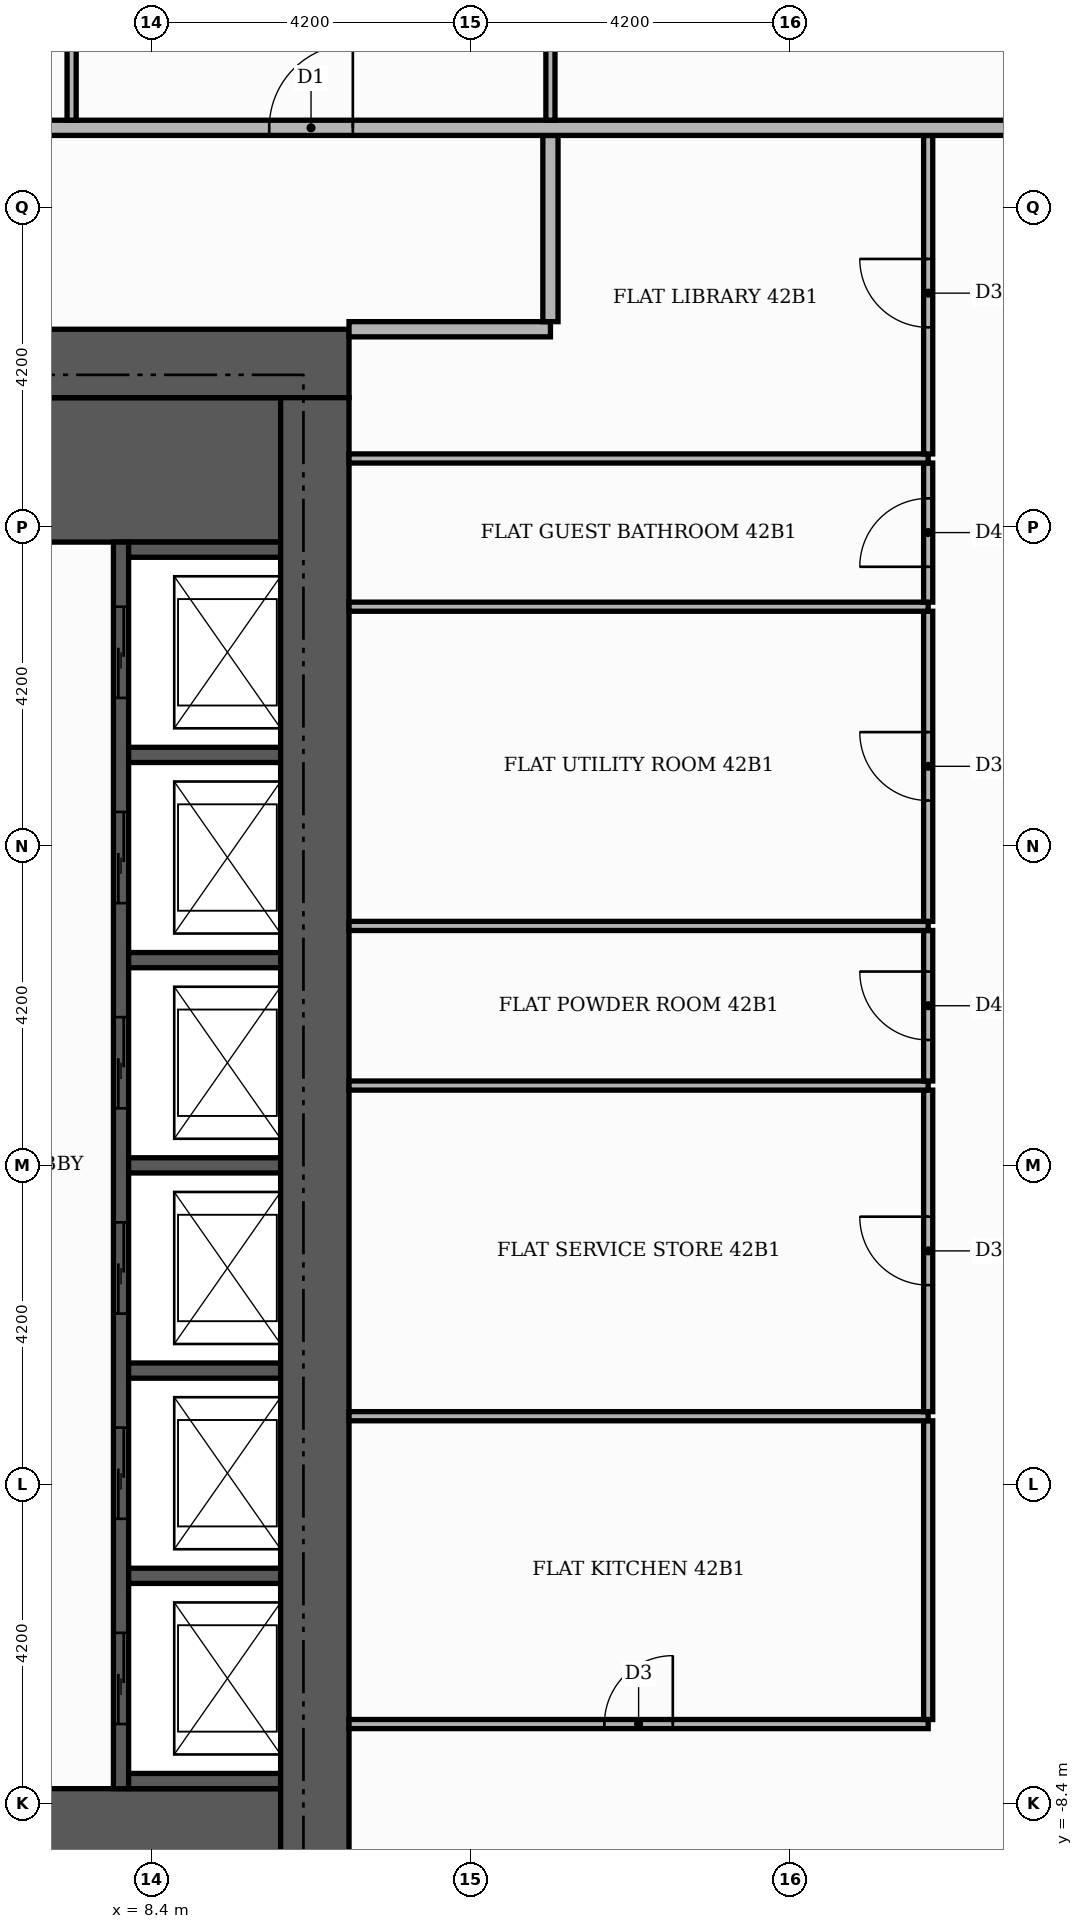
"""IFC4 building model, lengths in metres.
Left out: names, types, materials, properties, quantities, classifications, styles, units other than length and angle.
Written with IfcOpenShell. Run it as: python <this file> out.ifc"""

import sys

from ifc_helpers import new_model, si_unit, direction, frame, frame_2d, origin, place, context, subcontext, project, spatial, rectangle, extrude, element, fill, save


model = new_model("IFC4")
c1 = context("Model", 3, precision=1e-05, world=origin(), true_north=direction((0.0, 1.0)))
c2 = subcontext(c1, "Body", "Model", "MODEL_VIEW")
j1 = project(units=[si_unit("LENGTHUNIT", "METRE"), si_unit("PLANEANGLEUNIT", "RADIAN")], contexts=[c1])
p1 = place(None, origin())
s1 = spatial("IfcSite", under=j1, at=p1, CompositionType="ELEMENT")
p2 = place(p1, origin())
s2 = spatial("IfcBuilding", under=s1, at=p2, CompositionType="ELEMENT")
p3 = place(p2, frame((0.0, 0.0, 176.7)))
s3 = spatial("IfcBuildingStorey", under=s2, at=p3, CompositionType="ELEMENT", Elevation=176.7)
for number, where, z_axis, x_axis in (
    (1, (5.5, -9.15, 0.0), (0.0, 0.0, 1.0), (1.0, 0.0, 0.0)),
    (2, (5.5, 9.15, 0.0), (0.0, 0.0, 1.0), (1.0, 0.0, 0.0)),
):
    element("IfcWall", number, at=place(p3, frame(where, z_axis=z_axis, x_axis=x_axis)), inside=s3, PredefinedType="SHEAR", context=c2, shape_type="SweptSolid", body=[
        extrude(rectangle(XDim=4.6, YDim=1.9, at=frame_2d((2.3, 0.0))), origin(), (0.0, 0.0, 1.0), 3.4),
    ])
p4 = place(p3, frame((8.0, -8.2, 0.0), z_axis=(0.0, 0.0, 1.0), x_axis=(0.0, 1.0, 0.0)))
e3 = element("IfcWall", 3, at=p4, inside=s3, PredefinedType="SHEAR", context=c2, shape_type="SweptSolid", body=[
    extrude(rectangle(XDim=16.4, YDim=0.2, at=frame_2d((8.2, 0.0))), origin(), (0.0, 0.0, 1.0), 3.4),
])
p5 = place(p4, frame((0.85, 0.0, 0.0)))
e4 = element("IfcOpeningElement", 4, at=p5, cuts=e3, PredefinedType="OPENING", context=c2, shape_type="SweptSolid", body=[
    extrude(rectangle(XDim=1.2, YDim=2.1, at=frame_2d((0.6, 1.05))), frame((0.0, 0.11, 0.0), z_axis=(0.0, -1.0, 0.0), x_axis=(1.0, 0.0, 0.0)), (0.0, 0.0, 1.0), 0.22),
])
p6 = place(p4, frame((3.55, 0.0, 0.0)))
e5 = element("IfcOpeningElement", 5, at=p6, cuts=e3, PredefinedType="OPENING", context=c2, shape_type="SweptSolid", body=[
    extrude(rectangle(XDim=1.2, YDim=2.1, at=frame_2d((0.6, 1.05))), frame((0.0, 0.11, 0.0), z_axis=(0.0, -1.0, 0.0), x_axis=(1.0, 0.0, 0.0)), (0.0, 0.0, 1.0), 0.22),
])
p7 = place(p4, frame((6.25, 0.0, 0.0)))
e6 = element("IfcOpeningElement", 6, at=p7, cuts=e3, PredefinedType="OPENING", context=c2, shape_type="SweptSolid", body=[
    extrude(rectangle(XDim=1.2, YDim=2.1, at=frame_2d((0.6, 1.05))), frame((0.0, 0.11, 0.0), z_axis=(0.0, -1.0, 0.0), x_axis=(1.0, 0.0, 0.0)), (0.0, 0.0, 1.0), 0.22),
])
p8 = place(p4, frame((8.95, 0.0, 0.0)))
e7 = element("IfcOpeningElement", 7, at=p8, cuts=e3, PredefinedType="OPENING", context=c2, shape_type="SweptSolid", body=[
    extrude(rectangle(XDim=1.2, YDim=2.1, at=frame_2d((0.6, 1.05))), frame((0.0, 0.11, 0.0), z_axis=(0.0, -1.0, 0.0), x_axis=(1.0, 0.0, 0.0)), (0.0, 0.0, 1.0), 0.22),
])
p9 = place(p4, frame((11.65, 0.0, 0.0)))
e8 = element("IfcOpeningElement", 8, at=p9, cuts=e3, PredefinedType="OPENING", context=c2, shape_type="SweptSolid", body=[
    extrude(rectangle(XDim=1.2, YDim=2.1, at=frame_2d((0.6, 1.05))), frame((0.0, 0.11, 0.0), z_axis=(0.0, -1.0, 0.0), x_axis=(1.0, 0.0, 0.0)), (0.0, 0.0, 1.0), 0.22),
])
p10 = place(p4, frame((14.35, 0.0, 0.0)))
e9 = element("IfcOpeningElement", 9, at=p10, cuts=e3, PredefinedType="OPENING", context=c2, shape_type="SweptSolid", body=[
    extrude(rectangle(XDim=1.2, YDim=2.1, at=frame_2d((0.6, 1.05))), frame((0.0, 0.11, 0.0), z_axis=(0.0, -1.0, 0.0), x_axis=(1.0, 0.0, 0.0)), (0.0, 0.0, 1.0), 0.22),
])
for number, where, z_axis, x_axis in (
    (10, (8.1, -8.1, 0.0), (0.0, 0.0, 1.0), (1.0, 0.0, 0.0)),
    (11, (8.1, -5.4, 0.0), (0.0, 0.0, 1.0), (1.0, 0.0, 0.0)),
    (12, (8.1, -2.7, 0.0), (0.0, 0.0, 1.0), (1.0, 0.0, 0.0)),
    (13, (8.1, 0.0, 0.0), (0.0, 0.0, 1.0), (1.0, 0.0, 0.0)),
    (14, (8.1, 2.7, 0.0), (0.0, 0.0, 1.0), (1.0, 0.0, 0.0)),
    (15, (8.1, 5.4, 0.0), (0.0, 0.0, 1.0), (1.0, 0.0, 0.0)),
    (16, (8.1, 8.1, 0.0), (0.0, 0.0, 1.0), (1.0, 0.0, 0.0)),
):
    element("IfcWall", number, at=place(p3, frame(where, z_axis=z_axis, x_axis=x_axis)), inside=s3, PredefinedType="SHEAR", context=c2, shape_type="SweptSolid", body=[
        extrude(rectangle(XDim=2.0, YDim=0.2, at=frame_2d((1.0, 0.0))), origin(), (0.0, 0.0, 1.0), 3.4),
    ])
p11 = place(p3, frame((-11.0, 10.55, 0.0), z_axis=(0.0, 0.0, 1.0), x_axis=(1.0, 0.0, 0.0)))
e17 = element("IfcWall", 17, at=p11, inside=s3, PredefinedType="SHEAR", context=c2, shape_type="SweptSolid", body=[
    extrude(rectangle(XDim=22.0, YDim=0.9, at=frame_2d((11.0, 0.0))), origin(), (0.0, 0.0, 1.0), 3.4),
])
p12 = place(p11, frame((13.3, 0.0, 0.0)))
e18 = element("IfcOpeningElement", 18, at=p12, cuts=e17, PredefinedType="OPENING", context=c2, shape_type="SweptSolid", body=[
    extrude(rectangle(XDim=1.8, YDim=2.2, at=frame_2d((0.9, 1.1))), frame((0.0, 0.46, 0.0), z_axis=(0.0, -1.0, 0.0), x_axis=(1.0, 0.0, 0.0)), (0.0, 0.0, 1.0), 0.92),
])
p13 = place(p3, frame((10.55, -10.1, 0.0), z_axis=(0.0, 0.0, 1.0), x_axis=(0.0, 1.0, 0.0)))
e19 = element("IfcWall", 19, at=p13, inside=s3, PredefinedType="SHEAR", context=c2, shape_type="SweptSolid", body=[
    extrude(rectangle(XDim=20.2, YDim=0.9, at=frame_2d((10.1, 0.0))), origin(), (0.0, 0.0, 1.0), 3.4),
])
p14 = place(p3, frame((11.0, -7.35, 0.0), z_axis=(0.0, 0.0, 1.0), x_axis=(1.0, 0.0, 0.0)))
e20 = element("IfcWall", 20, at=p14, inside=s3, PredefinedType="PARTITIONING", context=c2, shape_type="SweptSolid", body=[
    extrude(rectangle(XDim=7.62, YDim=0.12, at=frame_2d((3.81, 0.0))), origin(), (0.0, 0.0, 1.0), 3.4),
])
p15 = place(p14, frame((3.36, 0.0, 0.0)))
e21 = element("IfcOpeningElement", 21, at=p15, cuts=e20, PredefinedType="OPENING", context=c2, shape_type="SweptSolid", body=[
    extrude(rectangle(XDim=0.9, YDim=2.1, at=frame_2d((0.45, 1.05))), frame((0.0, 0.07, 0.0), z_axis=(0.0, -1.0, 0.0), x_axis=(1.0, 0.0, 0.0)), (0.0, 0.0, 1.0), 0.14),
])
p16 = place(p3, frame((18.62, -7.29, 0.0), z_axis=(0.0, 0.0, 1.0), x_axis=(0.0, 1.0, 0.0)))
e22 = element("IfcWall", 22, at=p16, inside=s3, PredefinedType="PARTITIONING", context=c2, shape_type="SweptSolid", body=[
    extrude(rectangle(XDim=3.93, YDim=0.12, at=frame_2d((1.965, 0.0))), origin(), (0.0, 0.0, 1.0), 3.4),
])
p17 = place(p3, frame((11.0, -3.3, 0.0), z_axis=(0.0, 0.0, 1.0), x_axis=(1.0, 0.0, 0.0)))
e23 = element("IfcWall", 23, at=p17, inside=s3, PredefinedType="PARTITIONING", context=c2, shape_type="SweptSolid", body=[
    extrude(rectangle(XDim=7.62, YDim=0.12, at=frame_2d((3.81, 0.0))), origin(), (0.0, 0.0, 1.0), 3.4),
])
p18 = place(p3, frame((18.62, -3.24, 0.0), z_axis=(0.0, 0.0, 1.0), x_axis=(0.0, 1.0, 0.0)))
e24 = element("IfcWall", 24, at=p18, inside=s3, PredefinedType="PARTITIONING", context=c2, shape_type="SweptSolid", body=[
    extrude(rectangle(XDim=4.23, YDim=0.12, at=frame_2d((2.115, 0.0))), origin(), (0.0, 0.0, 1.0), 3.4),
])
p19 = place(p18, frame((1.665, 0.0, 0.0)))
e25 = element("IfcOpeningElement", 25, at=p19, cuts=e24, PredefinedType="OPENING", context=c2, shape_type="SweptSolid", body=[
    extrude(rectangle(XDim=0.9, YDim=2.1, at=frame_2d((0.45, 1.05))), frame((0.0, 0.07, 0.0), z_axis=(0.0, -1.0, 0.0), x_axis=(1.0, 0.0, 0.0)), (0.0, 0.0, 1.0), 0.14),
])
p20 = place(p3, frame((11.0, 1.05, 0.0), z_axis=(0.0, 0.0, 1.0), x_axis=(1.0, 0.0, 0.0)))
e26 = element("IfcWall", 26, at=p20, inside=s3, PredefinedType="PARTITIONING", context=c2, shape_type="SweptSolid", body=[
    extrude(rectangle(XDim=7.62, YDim=0.12, at=frame_2d((3.81, 0.0))), origin(), (0.0, 0.0, 1.0), 3.4),
])
p21 = place(p3, frame((18.62, 1.11, 0.0), z_axis=(0.0, 0.0, 1.0), x_axis=(0.0, 1.0, 0.0)))
e27 = element("IfcWall", 27, at=p21, inside=s3, PredefinedType="PARTITIONING", context=c2, shape_type="SweptSolid", body=[
    extrude(rectangle(XDim=1.98, YDim=0.12, at=frame_2d((0.99, 0.0))), origin(), (0.0, 0.0, 1.0), 3.4),
])
p22 = place(p21, frame((0.54, 0.0, 0.0)))
e28 = element("IfcOpeningElement", 28, at=p22, cuts=e27, PredefinedType="OPENING", context=c2, shape_type="SweptSolid", body=[
    extrude(rectangle(XDim=0.9, YDim=2.1, at=frame_2d((0.45, 1.05))), frame((0.0, 0.07, 0.0), z_axis=(0.0, -1.0, 0.0), x_axis=(1.0, 0.0, 0.0)), (0.0, 0.0, 1.0), 0.14),
])
p23 = place(p3, frame((11.0, 3.15, 0.0), z_axis=(0.0, 0.0, 1.0), x_axis=(1.0, 0.0, 0.0)))
e29 = element("IfcWall", 29, at=p23, inside=s3, PredefinedType="PARTITIONING", context=c2, shape_type="SweptSolid", body=[
    extrude(rectangle(XDim=7.62, YDim=0.12, at=frame_2d((3.81, 0.0))), origin(), (0.0, 0.0, 1.0), 3.4),
])
p24 = place(p3, frame((18.62, 3.21, 0.0), z_axis=(0.0, 0.0, 1.0), x_axis=(0.0, 1.0, 0.0)))
e30 = element("IfcWall", 30, at=p24, inside=s3, PredefinedType="PARTITIONING", context=c2, shape_type="SweptSolid", body=[
    extrude(rectangle(XDim=4.08, YDim=0.12, at=frame_2d((2.04, 0.0))), origin(), (0.0, 0.0, 1.0), 3.4),
])
p25 = place(p24, frame((1.59, 0.0, 0.0)))
e31 = element("IfcOpeningElement", 31, at=p25, cuts=e30, PredefinedType="OPENING", context=c2, shape_type="SweptSolid", body=[
    extrude(rectangle(XDim=0.9, YDim=2.1, at=frame_2d((0.45, 1.05))), frame((0.0, 0.07, 0.0), z_axis=(0.0, -1.0, 0.0), x_axis=(1.0, 0.0, 0.0)), (0.0, 0.0, 1.0), 0.14),
])
p26 = place(p3, frame((11.0, 7.35, 0.0), z_axis=(0.0, 0.0, 1.0), x_axis=(1.0, 0.0, 0.0)))
e32 = element("IfcWall", 32, at=p26, inside=s3, PredefinedType="PARTITIONING", context=c2, shape_type="SweptSolid", body=[
    extrude(rectangle(XDim=7.62, YDim=0.12, at=frame_2d((3.81, 0.0))), origin(), (0.0, 0.0, 1.0), 3.4),
])
p27 = place(p3, frame((18.62, 7.41, 0.0), z_axis=(0.0, 0.0, 1.0), x_axis=(0.0, 1.0, 0.0)))
e33 = element("IfcWall", 33, at=p27, inside=s3, PredefinedType="PARTITIONING", context=c2, shape_type="SweptSolid", body=[
    extrude(rectangle(XDim=1.83, YDim=0.12, at=frame_2d((0.915, 0.0))), origin(), (0.0, 0.0, 1.0), 3.4),
])
p28 = place(p27, frame((0.465, 0.0, 0.0)))
e34 = element("IfcOpeningElement", 34, at=p28, cuts=e33, PredefinedType="OPENING", context=c2, shape_type="SweptSolid", body=[
    extrude(rectangle(XDim=0.9, YDim=2.1, at=frame_2d((0.45, 1.05))), frame((0.0, 0.07, 0.0), z_axis=(0.0, -1.0, 0.0), x_axis=(1.0, 0.0, 0.0)), (0.0, 0.0, 1.0), 0.14),
])
p29 = place(p3, frame((11.0, 9.3, 0.0), z_axis=(0.0, 0.0, 1.0), x_axis=(1.0, 0.0, 0.0)))
e35 = element("IfcWall", 35, at=p29, inside=s3, PredefinedType="PARTITIONING", context=c2, shape_type="SweptSolid", body=[
    extrude(rectangle(XDim=7.62, YDim=0.12, at=frame_2d((3.81, 0.0))), origin(), (0.0, 0.0, 1.0), 3.4),
])
p30 = place(p3, frame((18.62, 9.36, 0.0), z_axis=(0.0, 0.0, 1.0), x_axis=(0.0, 1.0, 0.0)))
e36 = element("IfcWall", 36, at=p30, inside=s3, PredefinedType="PARTITIONING", context=c2, shape_type="SweptSolid", body=[
    extrude(rectangle(XDim=4.19, YDim=0.12, at=frame_2d((2.095, 0.0))), origin(), (0.0, 0.0, 1.0), 3.4),
])
p31 = place(p30, frame((1.665, 0.0, 0.0)))
e37 = element("IfcOpeningElement", 37, at=p31, cuts=e36, PredefinedType="OPENING", context=c2, shape_type="SweptSolid", body=[
    extrude(rectangle(XDim=0.9, YDim=2.1, at=frame_2d((0.45, 1.05))), frame((0.0, 0.07, 0.0), z_axis=(0.0, -1.0, 0.0), x_axis=(1.0, 0.0, 0.0)), (0.0, 0.0, 1.0), 0.14),
])
p32 = place(p3, frame((11.0, 11.0, 0.0), z_axis=(0.0, 0.0, 1.0), x_axis=(1.0, 0.0, 0.0)))
e38 = element("IfcWall", 38, at=p32, inside=s3, PredefinedType="PARTITIONING", context=c2, shape_type="SweptSolid", body=[
    extrude(rectangle(XDim=2.65, YDim=0.2, at=frame_2d((1.325, 0.0))), origin(), (0.0, 0.0, 1.0), 3.4),
])
p33 = place(p3, frame((13.65, 11.1, 0.0), z_axis=(0.0, 0.0, 1.0), x_axis=(0.0, 1.0, 0.0)))
e39 = element("IfcWall", 39, at=p33, inside=s3, PredefinedType="PARTITIONING", context=c2, shape_type="SweptSolid", body=[
    extrude(rectangle(XDim=2.45, YDim=0.2, at=frame_2d((1.225, 0.0))), origin(), (0.0, 0.0, 1.0), 3.4),
])
p34 = place(p3, frame((-13.65, 13.65, 0.0), z_axis=(0.0, 0.0, 1.0), x_axis=(1.0, 0.0, 0.0)))
e40 = element("IfcWall", 40, at=p34, inside=s3, PredefinedType="PARTITIONING", context=c2, shape_type="SweptSolid", body=[
    extrude(rectangle(XDim=39.07, YDim=0.2, at=frame_2d((19.535, 0.0))), origin(), (0.0, 0.0, 1.0), 3.4),
])
p35 = place(p34, frame((23.6, 0.0, 0.0)))
e41 = element("IfcOpeningElement", 41, at=p35, cuts=e40, PredefinedType="OPENING", context=c2, shape_type="SweptSolid", body=[
    extrude(rectangle(XDim=1.1, YDim=2.4, at=frame_2d((0.55, 1.2))), frame((0.0, 0.11, 0.0), z_axis=(0.0, -1.0, 0.0), x_axis=(1.0, 0.0, 0.0)), (0.0, 0.0, 1.0), 0.22),
])
p36 = place(p3, frame((7.35, 13.75, 0.0), z_axis=(0.0, 0.0, 1.0), x_axis=(0.0, 1.0, 0.0)))
e42 = element("IfcWall", 42, at=p36, inside=s3, PredefinedType="PARTITIONING", context=c2, shape_type="SweptSolid", body=[
    extrude(rectangle(XDim=5.11, YDim=0.12, at=frame_2d((2.555, 0.0))), origin(), (0.0, 0.0, 1.0), 3.4),
])
p37 = place(p3, frame((13.65, 13.75, 0.0), z_axis=(0.0, 0.0, 1.0), x_axis=(0.0, 1.0, 0.0)))
e43 = element("IfcWall", 43, at=p37, inside=s3, PredefinedType="PARTITIONING", context=c2, shape_type="SweptSolid", body=[
    extrude(rectangle(XDim=6.669, YDim=0.12, at=frame_2d((3.334, 0.0))), origin(), (0.0, 0.0, 1.0), 3.4),
])
p38 = place(p37, frame((2.834, 0.0, 0.0)))
e44 = element("IfcOpeningElement", 44, at=p38, cuts=e43, PredefinedType="OPENING", context=c2, shape_type="SweptSolid", body=[
    extrude(rectangle(XDim=0.9, YDim=2.1, at=frame_2d((0.45, 1.05))), frame((0.0, 0.07, 0.0), z_axis=(0.0, -1.0, 0.0), x_axis=(1.0, 0.0, 0.0)), (0.0, 0.0, 1.0), 0.14),
])
p39 = place(p5, origin())
e45 = element("IfcDoor", 45, at=p39, inside=s3, OperationType="SLIDING_TO_LEFT", PredefinedType="DOOR", context=c2, shape_type="SweptSolid", body=[
    extrude(rectangle(XDim=1.2, YDim=2.1, at=frame_2d((0.6, 1.05))), frame((0.0, 0.025, 0.0), z_axis=(0.0, -1.0, 0.0), x_axis=(1.0, 0.0, 0.0)), (0.0, 0.0, 1.0), 0.05),
])
fill(e4, e45)
p40 = place(p6, origin())
e46 = element("IfcDoor", 46, at=p40, inside=s3, OperationType="SLIDING_TO_LEFT", PredefinedType="DOOR", context=c2, shape_type="SweptSolid", body=[
    extrude(rectangle(XDim=1.2, YDim=2.1, at=frame_2d((0.6, 1.05))), frame((0.0, 0.025, 0.0), z_axis=(0.0, -1.0, 0.0), x_axis=(1.0, 0.0, 0.0)), (0.0, 0.0, 1.0), 0.05),
])
fill(e5, e46)
p41 = place(p7, origin())
e47 = element("IfcDoor", 47, at=p41, inside=s3, OperationType="SLIDING_TO_LEFT", PredefinedType="DOOR", context=c2, shape_type="SweptSolid", body=[
    extrude(rectangle(XDim=1.2, YDim=2.1, at=frame_2d((0.6, 1.05))), frame((0.0, 0.025, 0.0), z_axis=(0.0, -1.0, 0.0), x_axis=(1.0, 0.0, 0.0)), (0.0, 0.0, 1.0), 0.05),
])
fill(e6, e47)
p42 = place(p8, origin())
e48 = element("IfcDoor", 48, at=p42, inside=s3, OperationType="SLIDING_TO_LEFT", PredefinedType="DOOR", context=c2, shape_type="SweptSolid", body=[
    extrude(rectangle(XDim=1.2, YDim=2.1, at=frame_2d((0.6, 1.05))), frame((0.0, 0.025, 0.0), z_axis=(0.0, -1.0, 0.0), x_axis=(1.0, 0.0, 0.0)), (0.0, 0.0, 1.0), 0.05),
])
fill(e7, e48)
p43 = place(p9, origin())
e49 = element("IfcDoor", 49, at=p43, inside=s3, OperationType="SLIDING_TO_LEFT", PredefinedType="DOOR", context=c2, shape_type="SweptSolid", body=[
    extrude(rectangle(XDim=1.2, YDim=2.1, at=frame_2d((0.6, 1.05))), frame((0.0, 0.025, 0.0), z_axis=(0.0, -1.0, 0.0), x_axis=(1.0, 0.0, 0.0)), (0.0, 0.0, 1.0), 0.05),
])
fill(e8, e49)
p44 = place(p10, origin())
e50 = element("IfcDoor", 50, at=p44, inside=s3, OperationType="SLIDING_TO_LEFT", PredefinedType="DOOR", context=c2, shape_type="SweptSolid", body=[
    extrude(rectangle(XDim=1.2, YDim=2.1, at=frame_2d((0.6, 1.05))), frame((0.0, 0.025, 0.0), z_axis=(0.0, -1.0, 0.0), x_axis=(1.0, 0.0, 0.0)), (0.0, 0.0, 1.0), 0.05),
])
fill(e9, e50)
p45 = place(p15, origin())
e51 = element("IfcDoor", 51, at=p45, inside=s3, OperationType="SINGLE_SWING_RIGHT", PredefinedType="DOOR", context=c2, shape_type="SweptSolid", body=[
    extrude(rectangle(XDim=0.9, YDim=2.1, at=frame_2d((0.45, 1.05))), frame((0.0, 0.025, 0.0), z_axis=(0.0, -1.0, 0.0), x_axis=(1.0, 0.0, 0.0)), (0.0, 0.0, 1.0), 0.05),
])
fill(e21, e51)
p46 = place(p19, origin())
e52 = element("IfcDoor", 52, at=p46, inside=s3, OperationType="SINGLE_SWING_RIGHT", PredefinedType="DOOR", context=c2, shape_type="SweptSolid", body=[
    extrude(rectangle(XDim=0.9, YDim=2.1, at=frame_2d((0.45, 1.05))), frame((0.0, 0.025, 0.0), z_axis=(0.0, -1.0, 0.0), x_axis=(1.0, 0.0, 0.0)), (0.0, 0.0, 1.0), 0.05),
])
fill(e25, e52)
p47 = place(p22, origin())
e53 = element("IfcDoor", 53, at=p47, inside=s3, OperationType="SINGLE_SWING_RIGHT", PredefinedType="DOOR", context=c2, shape_type="SweptSolid", body=[
    extrude(rectangle(XDim=0.9, YDim=2.1, at=frame_2d((0.45, 1.05))), frame((0.0, 0.025, 0.0), z_axis=(0.0, -1.0, 0.0), x_axis=(1.0, 0.0, 0.0)), (0.0, 0.0, 1.0), 0.05),
])
fill(e28, e53)
p48 = place(p25, origin())
e54 = element("IfcDoor", 54, at=p48, inside=s3, OperationType="SINGLE_SWING_RIGHT", PredefinedType="DOOR", context=c2, shape_type="SweptSolid", body=[
    extrude(rectangle(XDim=0.9, YDim=2.1, at=frame_2d((0.45, 1.05))), frame((0.0, 0.025, 0.0), z_axis=(0.0, -1.0, 0.0), x_axis=(1.0, 0.0, 0.0)), (0.0, 0.0, 1.0), 0.05),
])
fill(e31, e54)
p49 = place(p28, origin())
e55 = element("IfcDoor", 55, at=p49, inside=s3, OperationType="SINGLE_SWING_LEFT", PredefinedType="DOOR", context=c2, shape_type="SweptSolid", body=[
    extrude(rectangle(XDim=0.9, YDim=2.1, at=frame_2d((0.45, 1.05))), frame((0.0, 0.025, 0.0), z_axis=(0.0, -1.0, 0.0), x_axis=(1.0, 0.0, 0.0)), (0.0, 0.0, 1.0), 0.05),
])
fill(e34, e55)
p50 = place(p31, origin())
e56 = element("IfcDoor", 56, at=p50, inside=s3, OperationType="SINGLE_SWING_RIGHT", PredefinedType="DOOR", context=c2, shape_type="SweptSolid", body=[
    extrude(rectangle(XDim=0.9, YDim=2.1, at=frame_2d((0.45, 1.05))), frame((0.0, 0.025, 0.0), z_axis=(0.0, -1.0, 0.0), x_axis=(1.0, 0.0, 0.0)), (0.0, 0.0, 1.0), 0.05),
])
fill(e37, e56)
p51 = place(p35, origin())
e57 = element("IfcDoor", 57, at=p51, inside=s3, OperationType="SINGLE_SWING_RIGHT", PredefinedType="DOOR", context=c2, shape_type="SweptSolid", body=[
    extrude(rectangle(XDim=1.1, YDim=2.4, at=frame_2d((0.55, 1.2))), frame((0.0, 0.025, 0.0), z_axis=(0.0, -1.0, 0.0), x_axis=(1.0, 0.0, 0.0)), (0.0, 0.0, 1.0), 0.05),
])
fill(e41, e57)
save(model, sys.argv[1])
